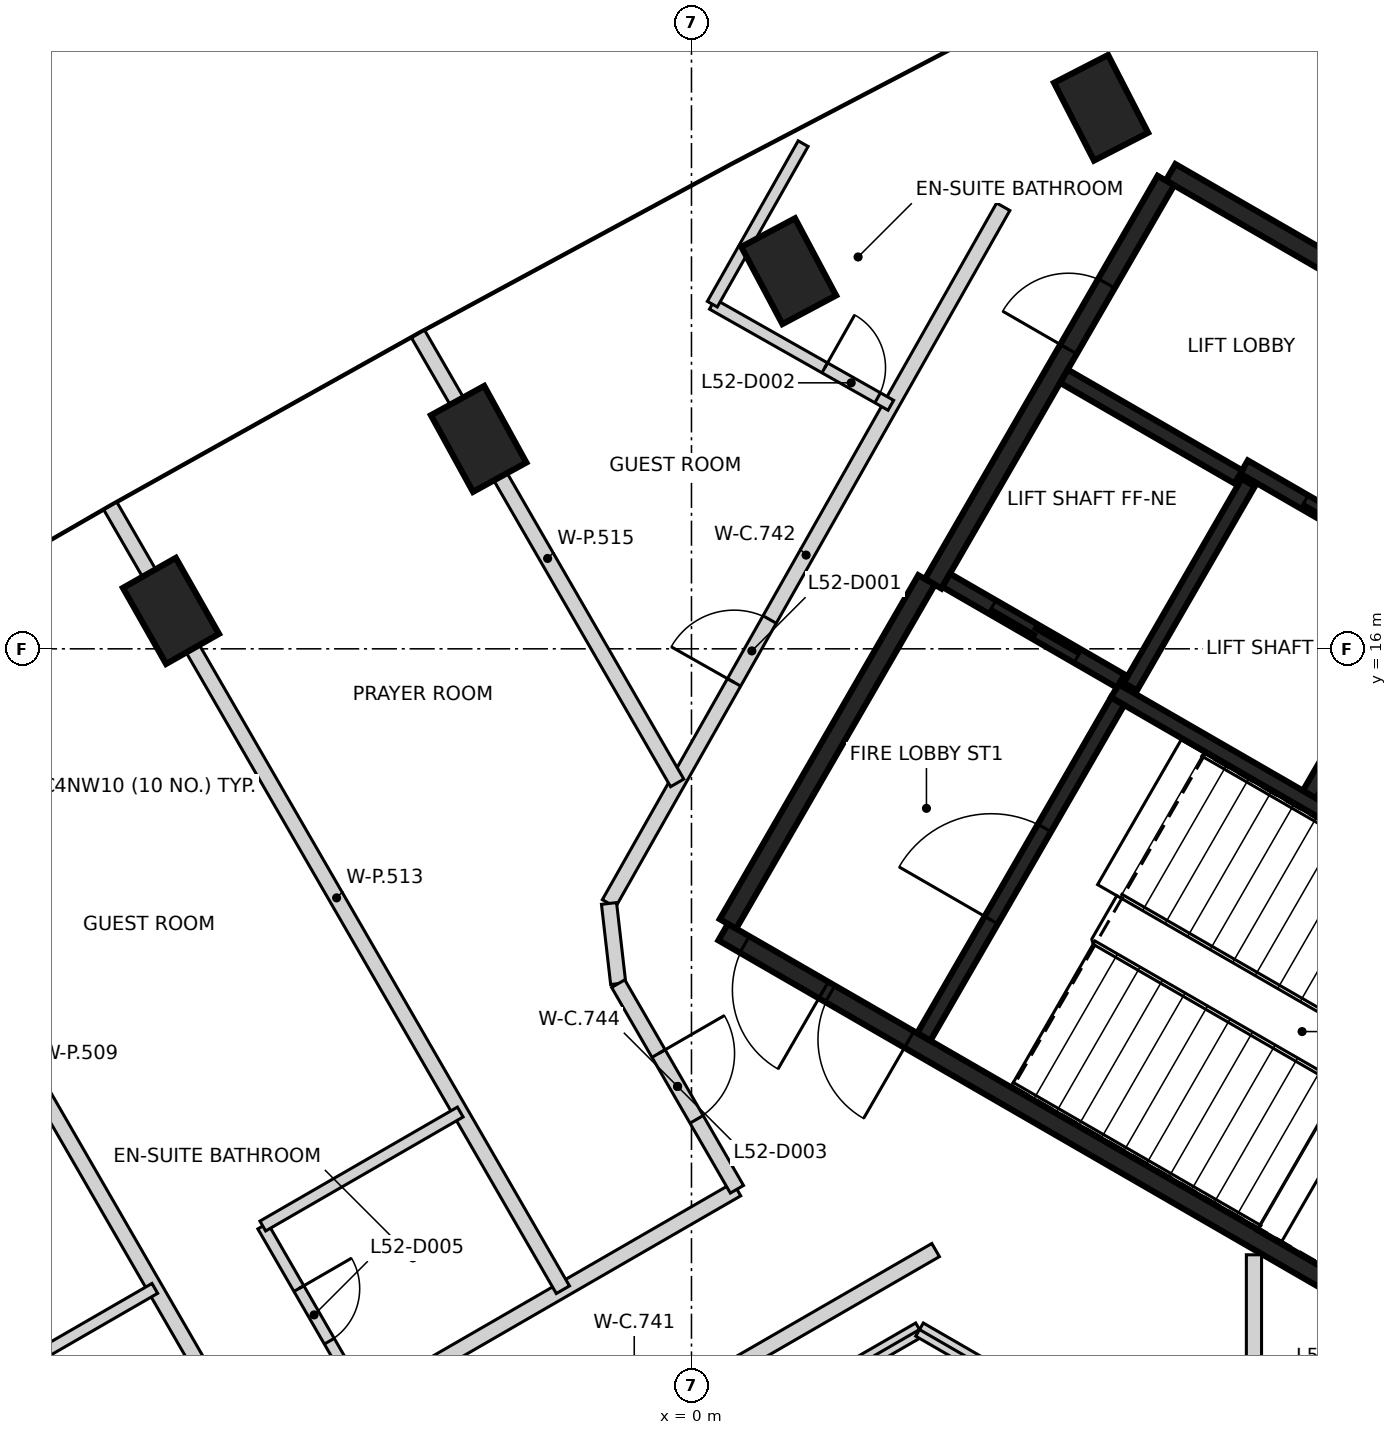
"""IFC4 building model, lengths in metres.
Left out: names, types, materials, properties, quantities, classifications, styles, units other than length and angle.
Written with IfcOpenShell. Run it as: python <this file> out.ifc"""

import sys

from ifc_helpers import new_model, si_unit, direction, frame, frame_2d, origin, origin_2d, place, context, subcontext, project, spatial, rectangle, extrude, element, fill, save


model = new_model("IFC4")
c1 = context("Model", 3, precision=1e-05, world=origin(), true_north=direction((0.0, 1.0)))
c2 = subcontext(c1, "Body", "Model", "MODEL_VIEW")
j1 = project(units=[si_unit("LENGTHUNIT", "METRE"), si_unit("PLANEANGLEUNIT", "RADIAN")], contexts=[c1])
p1 = place(None, origin())
s1 = spatial("IfcSite", under=j1, at=p1, CompositionType="ELEMENT")
p2 = place(p1, origin())
s2 = spatial("IfcBuilding", under=s1, at=p2, CompositionType="ELEMENT")
p3 = place(p2, frame((0.0, 0.0, 208.0)))
s3 = spatial("IfcBuildingStorey", under=s2, at=p3, CompositionType="ELEMENT", Elevation=208.0)
for number, where, z_axis, x_axis in (
    (1, (5.388, 23.118, -0.35), (0.0, 0.0, 1.0), (-0.458, 0.889, 0.0)),
    (2, (1.279, 20.968, -0.35), (0.0, 0.0, 1.0), (-0.47, 0.883, 0.0)),
    (3, (-2.8, 18.762, -0.35), (0.0, 0.0, 1.0), (-0.482, 0.876, 0.0)),
    (4, (-6.848, 16.499, -0.35), (0.0, 0.0, 1.0), (-0.494, 0.87, 0.0)),
):
    element("IfcColumn", number, at=place(p3, frame(where, z_axis=z_axis, x_axis=x_axis)), inside=s3, PredefinedType="COLUMN", context=c2, shape_type="SweptSolid", body=[
        extrude(rectangle(XDim=1.15, YDim=0.8, at=origin_2d()), origin(), (0.0, 0.0, 1.0), 2.736),
    ])
p4 = place(p3, frame((10.42, 6.498, 0.0), z_axis=(0.0, 0.0, 1.0), x_axis=(-0.866021906294, 0.500006057782, 0.0)))
e5 = element("IfcWall", 5, at=p4, inside=s3, PredefinedType="SHEAR", context=c2, shape_type="SweptSolid", body=[
    extrude(rectangle(XDim=11.55, YDim=0.25, at=frame_2d((5.775, 0.0))), origin(), (0.0, 0.0, 1.0), 3.2),
])
p5 = place(p4, frame((10.025, 0.0, 0.0)))
e6 = element("IfcOpeningElement", 6, at=p5, cuts=e5, PredefinedType="OPENING", context=c2, shape_type="SweptSolid", body=[
    extrude(rectangle(XDim=1.2, YDim=2.1, at=frame_2d((0.6, 1.05))), frame((0.0, 0.135, 0.0), z_axis=(0.0, -1.0, 0.0), x_axis=(1.0, 0.0, 0.0)), (0.0, 0.0, 1.0), 0.27),
])
p6 = place(p4, frame((8.725, 0.0, 0.0)))
e7 = element("IfcOpeningElement", 7, at=p6, cuts=e5, PredefinedType="OPENING", context=c2, shape_type="SweptSolid", body=[
    extrude(rectangle(XDim=1.2, YDim=2.1, at=frame_2d((0.6, 1.05))), frame((0.0, 0.135, 0.0), z_axis=(0.0, -1.0, 0.0), x_axis=(1.0, 0.0, 0.0)), (0.0, 0.0, 1.0), 0.27),
])
p7 = place(p3, frame((6.304, 22.269, 0.0), z_axis=(0.0, 0.0, 1.0), x_axis=(0.866022959057, -0.500004234368, 0.0)))
e8 = element("IfcWall", 8, at=p7, inside=s3, PredefinedType="SHEAR", context=c2, shape_type="SweptSolid", body=[
    extrude(rectangle(XDim=8.75, YDim=0.25, at=frame_2d((4.375, 0.0))), origin(), (0.0, 0.0, 1.0), 3.2),
])
p8 = place(p3, frame((3.179, 16.856, 0.0), z_axis=(0.0, 0.0, 1.0), x_axis=(0.500001955336, 0.866024274868, 0.0)))
e9 = element("IfcWall", 9, at=p8, inside=s3, PredefinedType="SHEAR", context=c2, shape_type="SweptSolid", body=[
    extrude(rectangle(XDim=6.125, YDim=0.25, at=frame_2d((3.062, 0.0))), origin(), (0.0, 0.0, 1.0), 3.2),
])
p9 = place(p8, frame((3.563, 0.0, 0.0)))
e10 = element("IfcOpeningElement", 10, at=p9, cuts=e9, PredefinedType="OPENING", context=c2, shape_type="SweptSolid", body=[
    extrude(rectangle(XDim=1.0, YDim=2.1, at=frame_2d((0.5, 1.05))), frame((0.0, 0.135, 0.0), z_axis=(0.0, -1.0, 0.0), x_axis=(1.0, 0.0, 0.0)), (0.0, 0.0, 1.0), 0.27),
])
p10 = place(p3, frame((0.48, 12.381, 0.0), z_axis=(0.0, 0.0, 1.0), x_axis=(0.49999885962, 0.866026062182, 0.0)))
e11 = element("IfcWall", 11, at=p10, inside=s3, PredefinedType="SHEAR", context=c2, shape_type="SweptSolid", body=[
    extrude(rectangle(XDim=5.225, YDim=0.25, at=frame_2d((2.612, 0.0))), origin(), (0.0, 0.0, 1.0), 3.2),
])
p11 = place(p3, frame((12.552, 15.342, 0.0), z_axis=(0.0, 0.0, 1.0), x_axis=(-0.866030299012, 0.499991521122, 0.0)))
e12 = element("IfcWall", 12, at=p11, inside=s3, PredefinedType="SHEAR", context=c2, shape_type="SweptSolid", body=[
    extrude(rectangle(XDim=6.1, YDim=0.2, at=frame_2d((3.05, 0.0))), origin(), (0.0, 0.0, 1.0), 3.2),
])
p12 = place(p11, frame((1.0, 0.0, 0.0)))
e13 = element("IfcOpeningElement", 13, at=p12, cuts=e12, PredefinedType="OPENING", context=c2, shape_type="SweptSolid", body=[
    extrude(rectangle(XDim=1.2, YDim=2.1, at=frame_2d((0.6, 1.05))), frame((0.0, 0.11, 0.0), z_axis=(0.0, -1.0, 0.0), x_axis=(1.0, 0.0, 0.0)), (0.0, 0.0, 1.0), 0.22),
])
p13 = place(p11, frame((3.982, 0.0, 0.0)))
e14 = element("IfcOpeningElement", 14, at=p13, cuts=e12, PredefinedType="OPENING", context=c2, shape_type="SweptSolid", body=[
    extrude(rectangle(XDim=1.2, YDim=2.1, at=frame_2d((0.6, 1.05))), frame((0.0, 0.11, 0.0), z_axis=(0.0, -1.0, 0.0), x_axis=(1.0, 0.0, 0.0)), (0.0, 0.0, 1.0), 0.22),
])
p14 = place(p3, frame((10.743, 12.46, 0.0), z_axis=(0.0, 0.0, 1.0), x_axis=(-0.866018848283, 0.500011354289, 0.0)))
e15 = element("IfcWall", 15, at=p14, inside=s3, PredefinedType="SHEAR", context=c2, shape_type="SweptSolid", body=[
    extrude(rectangle(XDim=5.974, YDim=0.2, at=frame_2d((2.987, 0.0))), origin(), (0.0, 0.0, 1.0), 3.2),
])
p15 = place(p3, frame((3.057, 10.895, 0.0), z_axis=(0.0, 0.0, 1.0), x_axis=(0.500027839223, 0.866009330205, 0.0)))
e16 = element("IfcWall", 16, at=p15, inside=s3, PredefinedType="SHEAR", context=c2, shape_type="SweptSolid", body=[
    extrude(rectangle(XDim=5.098, YDim=0.2, at=frame_2d((2.549, 0.0))), origin(), (0.0, 0.0, 1.0), 3.2),
])
p16 = place(p15, frame((1.774, 0.0, 0.0)))
e17 = element("IfcOpeningElement", 17, at=p16, cuts=e16, PredefinedType="OPENING", context=c2, shape_type="SweptSolid", body=[
    extrude(rectangle(XDim=1.4, YDim=2.1, at=frame_2d((0.7, 1.05))), frame((0.0, 0.11, 0.0), z_axis=(0.0, -1.0, 0.0), x_axis=(1.0, 0.0, 0.0)), (0.0, 0.0, 1.0), 0.22),
])
p17 = place(p3, frame((8.132, 14.084, 0.0), z_axis=(0.0, 0.0, 1.0), x_axis=(0.500030834389, 0.86600760081, 0.0)))
e18 = element("IfcWall", 18, at=p17, inside=s3, PredefinedType="SHEAR", context=c2, shape_type="SweptSolid", body=[
    extrude(rectangle(XDim=3.198, YDim=0.2, at=frame_2d((1.599, 0.0))), origin(), (0.0, 0.0, 1.0), 3.2),
])
p18 = place(p3, frame((7.324, 18.187, 0.0), z_axis=(0.0, 0.0, 1.0), x_axis=(-0.499967891604, -0.866043940782, 0.0)))
e19 = element("IfcWall", 19, at=p18, inside=s3, PredefinedType="SHEAR", context=c2, shape_type="SweptSolid", body=[
    extrude(rectangle(XDim=3.1, YDim=0.2, at=frame_2d((1.55, 0.0))), origin(), (0.0, 0.0, 1.0), 3.2),
])
p19 = place(p3, frame((5.646, 15.576, 0.0), z_axis=(0.0, 0.0, 1.0), x_axis=(-0.866018407898, 0.500012117035, 0.0)))
e20 = element("IfcWall", 20, at=p19, inside=s3, PredefinedType="SHEAR", context=c2, shape_type="SweptSolid", body=[
    extrude(rectangle(XDim=2.651, YDim=0.2, at=frame_2d((1.325, 0.0))), origin(), (0.0, 0.0, 1.0), 3.2),
])
p20 = place(p19, frame((0.652, 0.0, 0.0)))
e21 = element("IfcOpeningElement", 21, at=p20, cuts=e20, PredefinedType="OPENING", context=c2, shape_type="SweptSolid", body=[
    extrude(rectangle(XDim=1.3, YDim=2.1, at=frame_2d((0.65, 1.05))), frame((0.0, 0.11, 0.0), z_axis=(0.0, -1.0, 0.0), x_axis=(1.0, 0.0, 0.0)), (0.0, 0.0, 1.0), 0.22),
])
p21 = place(p3, frame((7.196, 18.26, 0.0), z_axis=(0.0, 0.0, 1.0), x_axis=(-0.866018407898, 0.500012117035, 0.0)))
e22 = element("IfcWall", 22, at=p21, inside=s3, PredefinedType="SHEAR", context=c2, shape_type="SweptSolid", body=[
    extrude(rectangle(XDim=2.651, YDim=0.2, at=frame_2d((1.325, 0.0))), origin(), (0.0, 0.0, 1.0), 3.2),
])
p22 = place(p3, frame((-10.652, 2.394, 0.0), z_axis=(0.0, 0.0, 1.0), x_axis=(0.866016271077, 0.500015817979, 0.0)))
e23 = element("IfcWall", 23, at=p22, inside=s3, PredefinedType="PARTITIONING", context=c2, shape_type="SweptSolid", body=[
    extrude(rectangle(XDim=12.991, YDim=0.2, at=frame_2d((6.495, 0.0))), origin(), (0.0, 0.0, 1.0), 3.2),
])
p23 = place(p22, frame((5.898, 0.0, 0.0)))
e24 = element("IfcOpeningElement", 24, at=p23, cuts=e23, PredefinedType="OPENING", context=c2, shape_type="SweptSolid", body=[
    extrude(rectangle(XDim=0.95, YDim=2.1, at=frame_2d((0.475, 1.05))), frame((0.0, 0.11, 0.0), z_axis=(0.0, -1.0, 0.0), x_axis=(1.0, 0.0, 0.0)), (0.0, 0.0, 1.0), 0.22),
])
p24 = place(p22, frame((1.571, 0.0, 0.0)))
e25 = element("IfcOpeningElement", 25, at=p24, cuts=e23, PredefinedType="OPENING", context=c2, shape_type="SweptSolid", body=[
    extrude(rectangle(XDim=0.95, YDim=2.1, at=frame_2d((0.475, 1.05))), frame((0.0, 0.11, 0.0), z_axis=(0.0, -1.0, 0.0), x_axis=(1.0, 0.0, 0.0)), (0.0, 0.0, 1.0), 0.22),
])
p25 = place(p3, frame((-4.718, 3.511, 0.0), z_axis=(0.0, 0.0, 1.0), x_axis=(0.865989775611, 0.500061704731, 0.0)))
e26 = element("IfcWall", 26, at=p25, inside=s3, PredefinedType="PARTITIONING", context=c2, shape_type="SweptSolid", body=[
    extrude(rectangle(XDim=9.157, YDim=0.2, at=frame_2d((4.579, 0.0))), origin(), (0.0, 0.0, 1.0), 3.2),
])
p26 = place(p25, frame((4.128, 0.0, 0.0)))
e27 = element("IfcOpeningElement", 27, at=p26, cuts=e26, PredefinedType="OPENING", context=c2, shape_type="SweptSolid", body=[
    extrude(rectangle(XDim=0.9, YDim=2.1, at=frame_2d((0.45, 1.05))), frame((0.0, 0.11, 0.0), z_axis=(0.0, -1.0, 0.0), x_axis=(1.0, 0.0, 0.0)), (0.0, 0.0, 1.0), 0.22),
])
p27 = place(p3, frame((-1.086, 12.65, 0.0), z_axis=(0.0, 0.0, 1.0), x_axis=(0.492552173528, 0.87028291742, 0.0)))
e28 = element("IfcWall", 28, at=p27, inside=s3, PredefinedType="PARTITIONING", context=c2, shape_type="SweptSolid", body=[
    extrude(rectangle(XDim=10.531, YDim=0.2, at=frame_2d((5.266, 0.0))), origin(), (0.0, 0.0, 1.0), 3.2),
])
p28 = place(p27, frame((3.342, 0.0, 0.0)))
e29 = element("IfcOpeningElement", 29, at=p28, cuts=e28, PredefinedType="OPENING", context=c2, shape_type="SweptSolid", body=[
    extrude(rectangle(XDim=0.95, YDim=2.1, at=frame_2d((0.475, 1.05))), frame((0.0, 0.11, 0.0), z_axis=(0.0, -1.0, 0.0), x_axis=(1.0, 0.0, 0.0)), (0.0, 0.0, 1.0), 0.22),
])
p29 = place(p3, frame((-1.085, 12.65, 0.0), z_axis=(0.0, 0.0, 1.0), x_axis=(0.113812454263, -0.993502252264, 0.0)))
e30 = element("IfcWall", 30, at=p29, inside=s3, PredefinedType="PARTITIONING", context=c2, shape_type="SweptSolid", body=[
    extrude(rectangle(XDim=1.062, YDim=0.2, at=frame_2d((0.531, 0.0))), origin(), (0.0, 0.0, 1.0), 3.2),
])
p30 = place(p3, frame((-0.964, 11.595, 0.0), z_axis=(0.0, 0.0, 1.0), x_axis=(0.500056215256, -0.865992945458, 0.0)))
e31 = element("IfcWall", 31, at=p30, inside=s3, PredefinedType="PARTITIONING", context=c2, shape_type="SweptSolid", body=[
    extrude(rectangle(XDim=3.124, YDim=0.2, at=frame_2d((1.562, 0.0))), origin(), (0.0, 0.0, 1.0), 3.2),
])
p31 = place(p30, frame((1.062, 0.0, 0.0)))
e32 = element("IfcOpeningElement", 32, at=p31, cuts=e31, PredefinedType="OPENING", context=c2, shape_type="SweptSolid", body=[
    extrude(rectangle(XDim=1.0, YDim=2.1, at=frame_2d((0.5, 1.05))), frame((0.0, 0.11, 0.0), z_axis=(0.0, -1.0, 0.0), x_axis=(1.0, 0.0, 0.0)), (0.0, 0.0, 1.0), 0.22),
])
p32 = place(p3, frame((7.4, -4.966, 0.0), z_axis=(0.0, 0.0, 1.0), x_axis=(0.0, 1.0, 0.0)))
e33 = element("IfcWall", 33, at=p32, inside=s3, PredefinedType="PARTITIONING", context=c2, shape_type="SweptSolid", body=[
    extrude(rectangle(XDim=12.994, YDim=0.2, at=frame_2d((6.497, 0.0))), origin(), (0.0, 0.0, 1.0), 3.2),
])
p33 = place(p32, frame((0.2, 0.0, 0.0)))
e34 = element("IfcOpeningElement", 34, at=p33, cuts=e33, PredefinedType="OPENING", context=c2, shape_type="SweptSolid", body=[
    extrude(rectangle(XDim=0.95, YDim=2.1, at=frame_2d((0.475, 1.05))), frame((0.0, 0.11, 0.0), z_axis=(0.0, -1.0, 0.0), x_axis=(1.0, 0.0, 0.0)), (0.0, 0.0, 1.0), 0.22),
])
p34 = place(p32, frame((10.473, 0.0, 0.0)))
e35 = element("IfcOpeningElement", 35, at=p34, cuts=e33, PredefinedType="OPENING", context=c2, shape_type="SweptSolid", body=[
    extrude(rectangle(XDim=0.95, YDim=2.1, at=frame_2d((0.475, 1.05))), frame((0.0, 0.11, 0.0), z_axis=(0.0, -1.0, 0.0), x_axis=(1.0, 0.0, 0.0)), (0.0, 0.0, 1.0), 0.22),
])
p35 = place(p3, frame((-11.661, 15.561, 0.0), z_axis=(0.0, 0.0, 1.0), x_axis=(0.499960887391, -0.866047984282, 0.0)))
e36 = element("IfcWall", 36, at=p35, inside=s3, PredefinedType="PARTITIONING", context=c2, shape_type="SweptSolid", body=[
    extrude(rectangle(XDim=11.907, YDim=0.2, at=frame_2d((5.953, 0.0))), origin(), (0.0, 0.0, 1.0), 3.2),
])
p36 = place(p3, frame((-7.646, 17.879, 0.0), z_axis=(0.0, 0.0, 1.0), x_axis=(0.500042538917, -0.866000842536, 0.0)))
e37 = element("IfcWall", 37, at=p36, inside=s3, PredefinedType="PARTITIONING", context=c2, shape_type="SweptSolid", body=[
    extrude(rectangle(XDim=11.906, YDim=0.2, at=frame_2d((5.953, 0.0))), origin(), (0.0, 0.0, 1.0), 3.2),
])
p37 = place(p3, frame((-4.318, 2.819, 0.0), z_axis=(0.0, 0.0, 1.0), x_axis=(0.866038843867, 0.499976720371, 0.0)))
e38 = element("IfcWall", 38, at=p37, inside=s3, PredefinedType="PARTITIONING", context=c2, shape_type="SweptSolid", body=[
    extrude(rectangle(XDim=8.45, YDim=0.2, at=frame_2d((4.225, 0.0))), origin(), (0.0, 0.0, 1.0), 3.2),
])
p38 = place(p3, frame((-3.598, 20.142, 0.0), z_axis=(0.0, 0.0, 1.0), x_axis=(0.499981732209, -0.866035950442, 0.0)))
e39 = element("IfcWall", 39, at=p38, inside=s3, PredefinedType="PARTITIONING", context=c2, shape_type="SweptSolid", body=[
    extrude(rectangle(XDim=6.82, YDim=0.2, at=frame_2d((3.41, 0.0))), origin(), (0.0, 0.0, 1.0), 3.2),
])
p39 = place(p3, frame((3.0, 7.044, 0.0), z_axis=(0.0, 0.0, 1.0), x_axis=(0.865872609263, -0.500264554538, 0.0)))
e40 = element("IfcWall", 40, at=p39, inside=s3, PredefinedType="PARTITIONING", context=c2, shape_type="SweptSolid", body=[
    extrude(rectangle(XDim=0.936, YDim=0.2, at=frame_2d((0.468, 0.0))), origin(), (0.0, 0.0, 1.0), 3.2),
])
p40 = place(p3, frame((-9.653, 6.089, 0.0), z_axis=(0.0, 0.0, 1.0), x_axis=(0.866021254674, 0.500007186402, 0.0)))
e41 = element("IfcWall", 41, at=p40, inside=s3, PredefinedType="PARTITIONING", context=c2, shape_type="SweptSolid", body=[
    extrude(rectangle(XDim=2.994, YDim=0.15, at=frame_2d((1.497, 0.0))), origin(), (0.0, 0.0, 1.0), 3.2),
])
p41 = place(p3, frame((-5.64, 8.406, 0.0), z_axis=(0.0, 0.0, 1.0), x_axis=(0.50001992892, -0.866013897511, 0.0)))
e42 = element("IfcWall", 42, at=p41, inside=s3, PredefinedType="PARTITIONING", context=c2, shape_type="SweptSolid", body=[
    extrude(rectangle(XDim=2.7, YDim=0.15, at=frame_2d((1.35, 0.0))), origin(), (0.0, 0.0, 1.0), 3.2),
])
p42 = place(p41, frame((0.95, 0.0, 0.0)))
e43 = element("IfcOpeningElement", 43, at=p42, cuts=e42, PredefinedType="OPENING", context=c2, shape_type="SweptSolid", body=[
    extrude(rectangle(XDim=0.8, YDim=2.1, at=frame_2d((0.4, 1.05))), frame((0.0, 0.085, 0.0), z_axis=(0.0, -1.0, 0.0), x_axis=(1.0, 0.0, 0.0)), (0.0, 0.0, 1.0), 0.17),
])
p43 = place(p3, frame((-5.64, 8.406, 0.0), z_axis=(0.0, 0.0, 1.0), x_axis=(0.866010750942, 0.50002537861, 0.0)))
e44 = element("IfcWall", 44, at=p43, inside=s3, PredefinedType="PARTITIONING", context=c2, shape_type="SweptSolid", body=[
    extrude(rectangle(XDim=3.0, YDim=0.15, at=frame_2d((1.5, 0.0))), origin(), (0.0, 0.0, 1.0), 3.2),
])
p44 = place(p3, frame((0.274, 20.534, 0.0), z_axis=(0.0, 0.0, 1.0), x_axis=(0.870234176559, -0.492638283072, 0.0)))
e45 = element("IfcWall", 45, at=p44, inside=s3, PredefinedType="PARTITIONING", context=c2, shape_type="SweptSolid", body=[
    extrude(rectangle(XDim=2.699, YDim=0.15, at=frame_2d((1.35, 0.0))), origin(), (0.0, 0.0, 1.0), 2.386),
])
p45 = place(p44, frame((1.7, 0.0, 0.0)))
e46 = element("IfcOpeningElement", 46, at=p45, cuts=e45, PredefinedType="OPENING", context=c2, shape_type="SweptSolid", body=[
    extrude(rectangle(XDim=0.8, YDim=2.1, at=frame_2d((0.4, 1.05))), frame((0.0, 0.085, 0.0), z_axis=(0.0, -1.0, 0.0), x_axis=(1.0, 0.0, 0.0)), (0.0, 0.0, 1.0), 0.17),
])
p46 = place(p3, frame((0.274, 20.534, 0.0), z_axis=(0.0, 0.0, 1.0), x_axis=(0.492461641571, 0.870334149383, 0.0)))
e47 = element("IfcWall", 47, at=p46, inside=s3, PredefinedType="PARTITIONING", context=c2, shape_type="SweptSolid", body=[
    extrude(rectangle(XDim=2.427, YDim=0.15, at=frame_2d((1.213, 0.0))), origin(), (0.0, 0.0, 1.0), 3.2),
])
p47 = place(p20, origin())
e48 = element("IfcDoor", 48, at=p47, inside=s3, OperationType="SLIDING_TO_RIGHT", PredefinedType="DOOR", context=c2, shape_type="SweptSolid", body=[
    extrude(rectangle(XDim=1.3, YDim=2.1, at=frame_2d((0.65, 1.05))), frame((0.0, 0.025, 0.0), z_axis=(0.0, -1.0, 0.0), x_axis=(1.0, 0.0, 0.0)), (0.0, 0.0, 1.0), 0.05),
])
fill(e21, e48)
p48 = place(p13, origin())
e49 = element("IfcDoor", 49, at=p48, inside=s3, OperationType="DOUBLE_DOOR_SLIDING", PredefinedType="DOOR", context=c2, shape_type="SweptSolid", body=[
    extrude(rectangle(XDim=1.2, YDim=2.1, at=frame_2d((0.6, 1.05))), frame((0.0, 0.025, 0.0), z_axis=(0.0, -1.0, 0.0), x_axis=(1.0, 0.0, 0.0)), (0.0, 0.0, 1.0), 0.05),
])
fill(e14, e49)
p49 = place(p9, origin())
e50 = element("IfcDoor", 50, at=p49, inside=s3, OperationType="SINGLE_SWING_LEFT", PredefinedType="DOOR", context=c2, shape_type="SweptSolid", body=[
    extrude(rectangle(XDim=1.0, YDim=2.1, at=frame_2d((0.5, 1.05))), frame((0.0, 0.025, 0.0), z_axis=(0.0, -1.0, 0.0), x_axis=(1.0, 0.0, 0.0)), (0.0, 0.0, 1.0), 0.05),
])
fill(e10, e50)
p50 = place(p5, origin())
e51 = element("IfcDoor", 51, at=p50, inside=s3, OperationType="SINGLE_SWING_LEFT", PredefinedType="DOOR", context=c2, shape_type="SweptSolid", body=[
    extrude(rectangle(XDim=1.2, YDim=2.1, at=frame_2d((0.6, 1.05))), frame((0.0, 0.025, 0.0), z_axis=(0.0, -1.0, 0.0), x_axis=(1.0, 0.0, 0.0)), (0.0, 0.0, 1.0), 0.05),
])
fill(e6, e51)
p51 = place(p6, origin())
e52 = element("IfcDoor", 52, at=p51, inside=s3, OperationType="SINGLE_SWING_RIGHT", PredefinedType="DOOR", context=c2, shape_type="SweptSolid", body=[
    extrude(rectangle(XDim=1.2, YDim=2.1, at=frame_2d((0.6, 1.05))), frame((0.0, 0.025, 0.0), z_axis=(0.0, -1.0, 0.0), x_axis=(1.0, 0.0, 0.0)), (0.0, 0.0, 1.0), 0.05),
])
fill(e7, e52)
p52 = place(p16, origin())
e53 = element("IfcDoor", 53, at=p52, inside=s3, OperationType="SINGLE_SWING_RIGHT", PredefinedType="DOOR", context=c2, shape_type="SweptSolid", body=[
    extrude(rectangle(XDim=1.4, YDim=2.1, at=frame_2d((0.7, 1.05))), frame((0.0, 0.025, 0.0), z_axis=(0.0, -1.0, 0.0), x_axis=(1.0, 0.0, 0.0)), (0.0, 0.0, 1.0), 0.05),
])
fill(e17, e53)
p53 = place(p28, origin())
e54 = element("IfcDoor", 54, at=p53, inside=s3, OperationType="SINGLE_SWING_LEFT", PredefinedType="DOOR", context=c2, shape_type="SweptSolid", body=[
    extrude(rectangle(XDim=0.95, YDim=2.1, at=frame_2d((0.475, 1.05))), frame((0.0, 0.025, 0.0), z_axis=(0.0, -1.0, 0.0), x_axis=(1.0, 0.0, 0.0)), (0.0, 0.0, 1.0), 0.05),
])
fill(e29, e54)
p54 = place(p45, frame((0.8, 0.0, 0.0), z_axis=(0.0, 0.0, 1.0), x_axis=(-1.0, 0.0, 0.0)))
e55 = element("IfcDoor", 55, at=p54, inside=s3, OperationType="SINGLE_SWING_LEFT", PredefinedType="DOOR", context=c2, shape_type="SweptSolid", body=[
    extrude(rectangle(XDim=0.8, YDim=2.1, at=frame_2d((0.4, 1.05))), frame((0.0, 0.025, 0.0), z_axis=(0.0, -1.0, 0.0), x_axis=(1.0, 0.0, 0.0)), (0.0, 0.0, 1.0), 0.05),
])
fill(e46, e55)
p55 = place(p31, frame((1.0, 0.0, 0.0), z_axis=(0.0, 0.0, 1.0), x_axis=(-1.0, 0.0, 0.0)))
e56 = element("IfcDoor", 56, at=p55, inside=s3, OperationType="SINGLE_SWING_LEFT", PredefinedType="DOOR", context=c2, shape_type="SweptSolid", body=[
    extrude(rectangle(XDim=1.0, YDim=2.1, at=frame_2d((0.5, 1.05))), frame((0.0, 0.025, 0.0), z_axis=(0.0, -1.0, 0.0), x_axis=(1.0, 0.0, 0.0)), (0.0, 0.0, 1.0), 0.05),
])
fill(e32, e56)
p56 = place(p42, origin())
e57 = element("IfcDoor", 57, at=p56, inside=s3, OperationType="SINGLE_SWING_LEFT", PredefinedType="DOOR", context=c2, shape_type="SweptSolid", body=[
    extrude(rectangle(XDim=0.8, YDim=2.1, at=frame_2d((0.4, 1.05))), frame((0.0, 0.025, 0.0), z_axis=(0.0, -1.0, 0.0), x_axis=(1.0, 0.0, 0.0)), (0.0, 0.0, 1.0), 0.05),
])
fill(e43, e57)
save(model, sys.argv[1])
